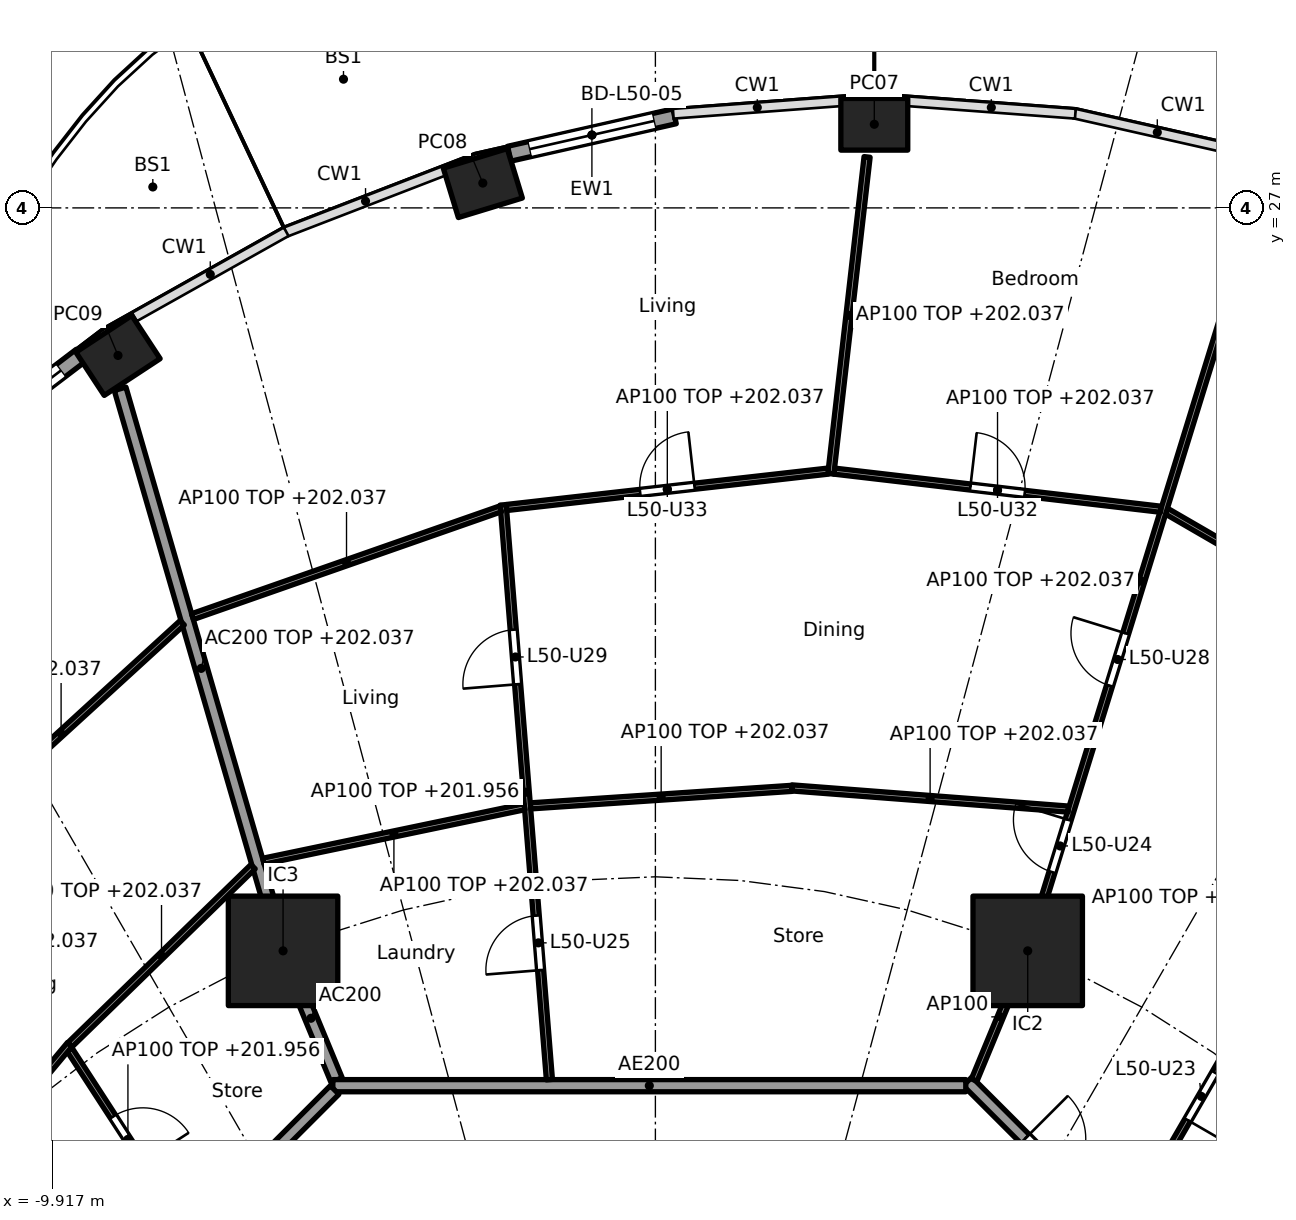
"""IFC4 building model, lengths in metres.
Left out: names, types, materials, properties, quantities, classifications, styles, units other than length and angle.
Written with IfcOpenShell. Run it as: python <this file> out.ifc"""

import sys

from ifc_helpers import new_model, si_unit, direction, frame, frame_2d, origin, origin_2d, place, context, subcontext, project, spatial, rectangle, hollow_rectangle, extrude, element, fill, save


model = new_model("IFC4")
c1 = context("Model", 3, precision=1e-05, world=origin(), true_north=direction((0.0, 1.0)))
c2 = subcontext(c1, "Body", "Model", "MODEL_VIEW")
j1 = project(units=[si_unit("LENGTHUNIT", "METRE"), si_unit("PLANEANGLEUNIT", "RADIAN")], contexts=[c1])
p1 = place(None, origin())
s1 = spatial("IfcSite", under=j1, at=p1, CompositionType="ELEMENT")
p2 = place(p1, origin())
s2 = spatial("IfcBuilding", under=s1, at=p2, CompositionType="ELEMENT")
p3 = place(p2, frame((0.0, 0.0, 199.2)))
s3 = spatial("IfcBuildingStorey", under=s2, at=p3, CompositionType="ELEMENT", Elevation=199.2)
for number, where, z_axis, x_axis in (
    (1, (3.6, 28.375, 0.0), (0.0, 0.0, 1.0), (-1.0, 0.0, 0.0)),
    (2, (-2.838, 27.408, 0.0), (0.0, 0.0, 1.0), (-0.957, -0.292, 0.0)),
    (3, (-8.837, 24.573, 0.0), (0.0, 0.0, 1.0), (-0.836, -0.549, 0.0)),
):
    element("IfcColumn", number, at=place(p3, frame(where, z_axis=z_axis, x_axis=x_axis)), inside=s3, PredefinedType="COLUMN", context=c2, shape_type="SweptSolid", body=[
        extrude(hollow_rectangle(XDim=1.1, YDim=0.85, WallThickness=0.036, at=origin_2d()), origin(), (0.0, 0.0, 1.0), 3.7),
    ])
for number, where, z_axis, x_axis in (
    (4, (6.123, 14.782, 0.0), (0.0, 0.0, 1.0), (1.0, 0.0, 0.0)),
    (5, (-6.123, 14.782, 0.0), (0.0, 0.0, 1.0), (1.0, 0.0, 0.0)),
):
    element("IfcColumn", number, at=place(p3, frame(where, z_axis=z_axis, x_axis=x_axis)), inside=s3, PredefinedType="COLUMN", context=c2, shape_type="SweptSolid", body=[
        extrude(rectangle(XDim=1.8, YDim=1.8, at=origin_2d()), origin(), (0.0, 0.0, 1.0), 3.7),
    ])
p4 = place(p3, frame((-2.404, 27.891, 0.0), z_axis=(0.0, 0.0, 1.0), x_axis=(0.975324329911, 0.220776926974, 0.0)))
e6 = element("IfcWall", 6, at=p4, inside=s3, PredefinedType="SOLIDWALL", context=c2, shape_type="SweptSolid", body=[
    extrude(rectangle(XDim=2.788, YDim=0.25, at=frame_2d((1.394, 0.0))), origin(), (0.0, 0.0, 1.0), 3.44),
])
p5 = place(p4, frame((0.344, 0.0, 0.0)))
e7 = element("IfcOpeningElement", 7, at=p5, cuts=e6, PredefinedType="OPENING", context=c2, shape_type="SweptSolid", body=[
    extrude(rectangle(XDim=2.1, YDim=2.4, at=frame_2d((1.05, 1.2))), frame((0.0, 0.135, 0.0), z_axis=(0.0, -1.0, 0.0), x_axis=(1.0, 0.0, 0.0)), (0.0, 0.0, 1.0), 0.27),
])
p6 = place(p3, frame((-11.772, 22.809, 0.0), z_axis=(0.0, 0.0, 1.0), x_axis=(0.796055733703, 0.60522332146, 0.0)))
e8 = element("IfcWall", 8, at=p6, inside=s3, PredefinedType="SOLIDWALL", context=c2, shape_type="SweptSolid", body=[
    extrude(rectangle(XDim=2.917, YDim=0.25, at=frame_2d((1.458, 0.0))), origin(), (0.0, 0.0, 1.0), 3.44),
])
p7 = place(p6, frame((0.408, 0.0, 0.0)))
e9 = element("IfcOpeningElement", 9, at=p7, cuts=e8, PredefinedType="OPENING", context=c2, shape_type="SweptSolid", body=[
    extrude(rectangle(XDim=2.1, YDim=2.4, at=frame_2d((1.05, 1.2))), frame((0.0, 0.135, 0.0), z_axis=(0.0, -1.0, 0.0), x_axis=(1.0, 0.0, 0.0)), (0.0, 0.0, 1.0), 0.27),
])
p8 = place(p3, frame((-5.243, 12.657, 0.0), z_axis=(0.0, 0.0, 1.0), x_axis=(-0.382707856524, 0.923869415315, 0.0)))
e10 = element("IfcWall", 10, at=p8, inside=s3, PredefinedType="PARTITIONING", context=c2, shape_type="SweptSolid", body=[
    extrude(rectangle(XDim=2.2, YDim=0.2, at=frame_2d((1.1, 0.0))), origin(), (0.0, 0.0, 1.0), 3.44),
])
p9 = place(p3, frame((-6.137, 14.83, 0.0), z_axis=(0.0, 0.0, 1.0), x_axis=(-0.278461169897, 0.96044748782, 0.0)))
e11 = element("IfcWall", 11, at=p9, inside=s3, PredefinedType="PARTITIONING", context=c2, shape_type="SweptSolid", body=[
    extrude(rectangle(XDim=9.573, YDim=0.2, at=frame_2d((4.787, 0.0))), origin(), (0.0, 0.0, 1.0), 2.837),
])
p10 = place(p3, frame((12.635, 5.134, 0.0), z_axis=(0.0, 0.0, 1.0), x_axis=(-0.707106781187, 0.707106781187, 0.0)))
e12 = element("IfcWall", 12, at=p10, inside=s3, PredefinedType="PARTITIONING", context=c2, shape_type="SweptSolid", body=[
    extrude(rectangle(XDim=10.609, YDim=0.2, at=frame_2d((5.305, 0.0))), origin(), (0.0, 0.0, 1.0), 3.44),
])
p11 = place(p10, frame((8.274, 0.0, 0.0)))
e13 = element("IfcOpeningElement", 13, at=p11, cuts=e12, PredefinedType="OPENING", context=c2, shape_type="SweptSolid", body=[
    extrude(rectangle(XDim=1.0, YDim=2.1, at=frame_2d((0.5, 1.05))), frame((0.0, 0.11, 0.0), z_axis=(0.0, -1.0, 0.0), x_axis=(1.0, 0.0, 0.0)), (0.0, 0.0, 1.0), 0.22),
])
p12 = place(p3, frame((5.104, 12.565, 0.0), z_axis=(0.0, 0.0, 1.0), x_axis=(-1.0, 0.0, 0.0)))
e14 = element("IfcWall", 14, at=p12, inside=s3, PredefinedType="PARTITIONING", context=c2, shape_type="SweptSolid", body=[
    extrude(rectangle(XDim=10.409, YDim=0.2, at=frame_2d((5.205, 0.0))), origin(), (0.0, 0.0, 1.0), 3.44),
])
p13 = place(p3, frame((-5.275, 12.494, 0.0), z_axis=(0.0, 0.0, 1.0), x_axis=(-0.707106781187, -0.707106781187, 0.0)))
e15 = element("IfcWall", 15, at=p13, inside=s3, PredefinedType="PARTITIONING", context=c2, shape_type="SweptSolid", body=[
    extrude(rectangle(XDim=10.209, YDim=0.2, at=frame_2d((5.104, 0.0))), origin(), (0.0, 0.0, 1.0), 3.44),
])
p14 = place(p3, frame((7.708, 10.198, 0.0), z_axis=(0.0, 0.0, 1.0), x_axis=(0.501288100085, 0.865280440501, 0.0)))
e16 = element("IfcWall", 16, at=p14, inside=s3, PredefinedType="PARTITIONING", context=c2, shape_type="SweptSolid", body=[
    extrude(rectangle(XDim=10.623, YDim=0.1, at=frame_2d((5.312, 0.0))), origin(), (0.0, 0.0, 1.0), 2.756),
])
p15 = place(p14, frame((2.082, 0.0, 0.0)))
e17 = element("IfcOpeningElement", 17, at=p15, cuts=e16, PredefinedType="OPENING", context=c2, shape_type="SweptSolid", body=[
    extrude(rectangle(XDim=0.9, YDim=2.1, at=frame_2d((0.45, 1.05))), frame((0.0, 0.06, 0.0), z_axis=(0.0, -1.0, 0.0), x_axis=(1.0, 0.0, 0.0)), (0.0, 0.0, 1.0), 0.12),
])
p16 = place(p14, frame((7.369, 0.0, 0.0)))
e18 = element("IfcOpeningElement", 18, at=p16, cuts=e16, PredefinedType="OPENING", context=c2, shape_type="SweptSolid", body=[
    extrude(rectangle(XDim=0.9, YDim=2.1, at=frame_2d((0.45, 1.05))), frame((0.0, 0.06, 0.0), z_axis=(0.0, -1.0, 0.0), x_axis=(1.0, 0.0, 0.0)), (0.0, 0.0, 1.0), 0.12),
])
p17 = place(p3, frame((12.965, 19.371, 0.0), z_axis=(0.0, 0.0, 1.0), x_axis=(-0.865277177388, 0.501293732547, 0.0)))
e19 = element("IfcWall", 19, at=p17, inside=s3, PredefinedType="PARTITIONING", context=c2, shape_type="SweptSolid", body=[
    extrude(rectangle(XDim=5.27, YDim=0.1, at=frame_2d((2.635, 0.0))), origin(), (0.0, 0.0, 1.0), 2.837),
])
p18 = place(p3, frame((5.243, 12.657, 0.0), z_axis=(0.0, 0.0, 1.0), x_axis=(0.382719158442, 0.923864733477, 0.0)))
e20 = element("IfcWall", 20, at=p18, inside=s3, PredefinedType="PARTITIONING", context=c2, shape_type="SweptSolid", body=[
    extrude(rectangle(XDim=2.25, YDim=0.1, at=frame_2d((1.125, 0.0))), origin(), (0.0, 0.0, 1.0), 3.44),
])
p19 = place(p3, frame((6.138, 14.83, 0.0), z_axis=(0.0, 0.0, 1.0), x_axis=(0.294818517221, 0.955553264818, 0.0)))
e21 = element("IfcWall", 21, at=p19, inside=s3, PredefinedType="PARTITIONING", context=c2, shape_type="SweptSolid", body=[
    extrude(rectangle(XDim=12.619, YDim=0.1, at=frame_2d((6.31, 0.0))), origin(), (0.0, 0.0, 1.0), 2.837),
])
p20 = place(p19, frame((1.306, 0.0, 0.0)))
e22 = element("IfcOpeningElement", 22, at=p20, cuts=e21, PredefinedType="OPENING", context=c2, shape_type="SweptSolid", body=[
    extrude(rectangle(XDim=0.9, YDim=2.1, at=frame_2d((0.45, 1.05))), frame((0.0, 0.06, 0.0), z_axis=(0.0, -1.0, 0.0), x_axis=(1.0, 0.0, 0.0)), (0.0, 0.0, 1.0), 0.12),
])
p21 = place(p19, frame((4.515, 0.0, 0.0)))
e23 = element("IfcOpeningElement", 23, at=p21, cuts=e21, PredefinedType="OPENING", context=c2, shape_type="SweptSolid", body=[
    extrude(rectangle(XDim=0.9, YDim=2.1, at=frame_2d((0.45, 1.05))), frame((0.0, 0.06, 0.0), z_axis=(0.0, -1.0, 0.0), x_axis=(1.0, 0.0, 0.0)), (0.0, 0.0, 1.0), 0.12),
])
p22 = place(p3, frame((6.791, 17.113, 0.0), z_axis=(0.0, 0.0, 1.0), x_axis=(-0.997077117727, 0.07640171009, 0.0)))
e24 = element("IfcWall", 24, at=p22, inside=s3, PredefinedType="PARTITIONING", context=c2, shape_type="SweptSolid", body=[
    extrude(rectangle(XDim=4.56, YDim=0.1, at=frame_2d((2.28, 0.0))), origin(), (0.0, 0.0, 1.0), 2.837),
])
p23 = place(p3, frame((8.312, 22.044, 0.0), z_axis=(0.0, 0.0, 1.0), x_axis=(-0.993245806382, 0.1160291692, 0.0)))
e25 = element("IfcWall", 25, at=p23, inside=s3, PredefinedType="PARTITIONING", context=c2, shape_type="SweptSolid", body=[
    extrude(rectangle(XDim=5.408, YDim=0.1, at=frame_2d((2.704, 0.0))), origin(), (0.0, 0.0, 1.0), 2.837),
])
p24 = place(p23, frame((2.254, 0.0, 0.0)))
e26 = element("IfcOpeningElement", 26, at=p24, cuts=e25, PredefinedType="OPENING", context=c2, shape_type="SweptSolid", body=[
    extrude(rectangle(XDim=0.9, YDim=2.1, at=frame_2d((0.45, 1.05))), frame((0.0, 0.06, 0.0), z_axis=(0.0, -1.0, 0.0), x_axis=(1.0, 0.0, 0.0)), (0.0, 0.0, 1.0), 0.12),
])
p25 = place(p3, frame((2.244, 17.455, 0.0), z_axis=(0.0, 0.0, 1.0), x_axis=(-0.997754717554, -0.066974051687, 0.0)))
e27 = element("IfcWall", 27, at=p25, inside=s3, PredefinedType="PARTITIONING", context=c2, shape_type="SweptSolid", body=[
    extrude(rectangle(XDim=4.309, YDim=0.1, at=frame_2d((2.154, 0.0))), origin(), (0.0, 0.0, 1.0), 2.837),
])
p26 = place(p3, frame((2.885, 22.627, 0.0), z_axis=(0.0, 0.0, 1.0), x_axis=(0.113634556485, 0.993522615531, 0.0)))
e28 = element("IfcWall", 28, at=p26, inside=s3, PredefinedType="PARTITIONING", context=c2, shape_type="SweptSolid", body=[
    extrude(rectangle(XDim=5.244, YDim=0.1, at=frame_2d((2.622, 0.0))), origin(), (0.0, 0.0, 1.0), 2.837),
])
p27 = place(p3, frame((2.842, 22.671, 0.0), z_axis=(0.0, 0.0, 1.0), x_axis=(-0.993660315081, -0.112424099879, 0.0)))
e29 = element("IfcWall", 29, at=p27, inside=s3, PredefinedType="PARTITIONING", context=c2, shape_type="SweptSolid", body=[
    extrude(rectangle(XDim=5.325, YDim=0.1, at=frame_2d((2.662, 0.0))), origin(), (0.0, 0.0, 1.0), 2.837),
])
p28 = place(p27, frame((2.212, 0.0, 0.0)))
e30 = element("IfcOpeningElement", 30, at=p28, cuts=e29, PredefinedType="OPENING", context=c2, shape_type="SweptSolid", body=[
    extrude(rectangle(XDim=0.9, YDim=2.1, at=frame_2d((0.45, 1.05))), frame((0.0, 0.06, 0.0), z_axis=(0.0, -1.0, 0.0), x_axis=(1.0, 0.0, 0.0)), (0.0, 0.0, 1.0), 0.12),
])
p29 = place(p3, frame((-1.743, 12.665, 0.0), z_axis=(0.0, 0.0, 1.0), x_axis=(-0.080170892619, 0.996781133437, 0.0)))
e31 = element("IfcWall", 31, at=p29, inside=s3, PredefinedType="PARTITIONING", context=c2, shape_type="SweptSolid", body=[
    extrude(rectangle(XDim=9.483, YDim=0.1, at=frame_2d((4.741, 0.0))), origin(), (0.0, 0.0, 1.0), 2.756),
])
p30 = place(p29, frame((1.806, 0.0, 0.0)))
e32 = element("IfcOpeningElement", 32, at=p30, cuts=e31, PredefinedType="OPENING", context=c2, shape_type="SweptSolid", body=[
    extrude(rectangle(XDim=0.9, YDim=2.1, at=frame_2d((0.45, 1.05))), frame((0.0, 0.06, 0.0), z_axis=(0.0, -1.0, 0.0), x_axis=(1.0, 0.0, 0.0)), (0.0, 0.0, 1.0), 0.12),
])
p31 = place(p29, frame((6.523, 0.0, 0.0)))
e33 = element("IfcOpeningElement", 33, at=p31, cuts=e31, PredefinedType="OPENING", context=c2, shape_type="SweptSolid", body=[
    extrude(rectangle(XDim=0.9, YDim=2.1, at=frame_2d((0.45, 1.05))), frame((0.0, 0.06, 0.0), z_axis=(0.0, -1.0, 0.0), x_axis=(1.0, 0.0, 0.0)), (0.0, 0.0, 1.0), 0.12),
])
p32 = place(p3, frame((-2.154, 17.152, 0.0), z_axis=(0.0, 0.0, 1.0), x_axis=(-0.978906251581, -0.204309937631, 0.0)))
e34 = element("IfcWall", 34, at=p32, inside=s3, PredefinedType="PARTITIONING", context=c2, shape_type="SweptSolid", body=[
    extrude(rectangle(XDim=4.385, YDim=0.1, at=frame_2d((2.193, 0.0))), origin(), (0.0, 0.0, 1.0), 2.837),
])
p33 = place(p3, frame((-2.546, 22.051, 0.0), z_axis=(0.0, 0.0, 1.0), x_axis=(-0.94391294884, -0.330194404878, 0.0)))
e35 = element("IfcWall", 35, at=p33, inside=s3, PredefinedType="PARTITIONING", context=c2, shape_type="SweptSolid", body=[
    extrude(rectangle(XDim=5.367, YDim=0.1, at=frame_2d((2.684, 0.0))), origin(), (0.0, 0.0, 1.0), 2.837),
])
p34 = place(p3, frame((-6.616, 16.166, 0.0), z_axis=(0.0, 0.0, 1.0), x_axis=(-0.716919058692, -0.697156412352, 0.0)))
e36 = element("IfcWall", 36, at=p34, inside=s3, PredefinedType="PARTITIONING", context=c2, shape_type="SweptSolid", body=[
    extrude(rectangle(XDim=4.2, YDim=0.1, at=frame_2d((2.1, 0.0))), origin(), (0.0, 0.0, 1.0), 2.837),
])
p35 = place(p3, frame((-7.781, 20.178, 0.0), z_axis=(0.0, 0.0, 1.0), x_axis=(-0.73807320557, -0.674720640872, 0.0)))
e37 = element("IfcWall", 37, at=p35, inside=s3, PredefinedType="PARTITIONING", context=c2, shape_type="SweptSolid", body=[
    extrude(rectangle(XDim=5.399, YDim=0.1, at=frame_2d((2.699, 0.0))), origin(), (0.0, 0.0, 1.0), 2.837),
])
p36 = place(p3, frame((-7.712, 10.195, 0.0), z_axis=(0.0, 0.0, 1.0), x_axis=(-0.544170086001, 0.838974920663, 0.0)))
e38 = element("IfcWall", 38, at=p36, inside=s3, PredefinedType="PARTITIONING", context=c2, shape_type="SweptSolid", body=[
    extrude(rectangle(XDim=3.535, YDim=0.1, at=frame_2d((1.768, 0.0))), origin(), (0.0, 0.0, 1.0), 2.756),
])
p37 = place(p36, frame((1.318, 0.0, 0.0)))
e39 = element("IfcOpeningElement", 39, at=p37, cuts=e38, PredefinedType="OPENING", context=c2, shape_type="SweptSolid", body=[
    extrude(rectangle(XDim=0.9, YDim=2.1, at=frame_2d((0.45, 1.05))), frame((0.0, 0.06, 0.0), z_axis=(0.0, -1.0, 0.0), x_axis=(1.0, 0.0, 0.0)), (0.0, 0.0, 1.0), 0.12),
])
p38 = place(p3, frame((-9.631, 13.242, 0.0), z_axis=(0.0, 0.0, 1.0), x_axis=(-0.640315711982, -0.768111833647, 0.0)))
e40 = element("IfcWall", 40, at=p38, inside=s3, PredefinedType="PARTITIONING", context=c2, shape_type="SweptSolid", body=[
    extrude(rectangle(XDim=4.572, YDim=0.1, at=frame_2d((2.286, 0.0))), origin(), (0.0, 0.0, 1.0), 2.837),
])
p39 = place(p5, origin())
e41 = element("IfcDoor", 41, at=p39, inside=s3, OperationType="SLIDING_TO_LEFT", PredefinedType="DOOR", context=c2, shape_type="SweptSolid", body=[
    extrude(rectangle(XDim=2.1, YDim=2.4, at=frame_2d((1.05, 1.2))), frame((0.0, 0.025, 0.0), z_axis=(0.0, -1.0, 0.0), x_axis=(1.0, 0.0, 0.0)), (0.0, 0.0, 1.0), 0.05),
])
fill(e7, e41)
p40 = place(p7, origin())
e42 = element("IfcDoor", 42, at=p40, inside=s3, OperationType="SLIDING_TO_LEFT", PredefinedType="DOOR", context=c2, shape_type="SweptSolid", body=[
    extrude(rectangle(XDim=2.1, YDim=2.4, at=frame_2d((1.05, 1.2))), frame((0.0, 0.025, 0.0), z_axis=(0.0, -1.0, 0.0), x_axis=(1.0, 0.0, 0.0)), (0.0, 0.0, 1.0), 0.05),
])
fill(e9, e42)
p41 = place(p11, frame((1.0, 0.0, 0.0), x_axis=(-1.0, 0.0, 0.0)))
e43 = element("IfcDoor", 43, at=p41, inside=s3, OperationType="SINGLE_SWING_LEFT", PredefinedType="DOOR", context=c2, shape_type="SweptSolid", body=[
    extrude(rectangle(XDim=1.0, YDim=2.1, at=frame_2d((0.5, 1.05))), frame((0.0, 0.025, 0.0), z_axis=(0.0, -1.0, 0.0), x_axis=(1.0, 0.0, 0.0)), (0.0, 0.0, 1.0), 0.05),
])
fill(e13, e43)
p42 = place(p15, frame((0.9, 0.0, 0.0), x_axis=(-1.0, 0.0, 0.0)))
e44 = element("IfcDoor", 44, at=p42, inside=s3, OperationType="SINGLE_SWING_RIGHT", PredefinedType="DOOR", context=c2, shape_type="SweptSolid", body=[
    extrude(rectangle(XDim=0.9, YDim=2.1, at=frame_2d((0.45, 1.05))), frame((0.0, 0.025, 0.0), z_axis=(0.0, -1.0, 0.0), x_axis=(1.0, 0.0, 0.0)), (0.0, 0.0, 1.0), 0.05),
])
fill(e17, e44)
p43 = place(p20, origin())
e45 = element("IfcDoor", 45, at=p43, inside=s3, OperationType="SINGLE_SWING_RIGHT", PredefinedType="DOOR", context=c2, shape_type="SweptSolid", body=[
    extrude(rectangle(XDim=0.9, YDim=2.1, at=frame_2d((0.45, 1.05))), frame((0.0, 0.025, 0.0), z_axis=(0.0, -1.0, 0.0), x_axis=(1.0, 0.0, 0.0)), (0.0, 0.0, 1.0), 0.05),
])
fill(e22, e45)
p44 = place(p30, origin())
e46 = element("IfcDoor", 46, at=p44, inside=s3, OperationType="SINGLE_SWING_LEFT", PredefinedType="DOOR", context=c2, shape_type="SweptSolid", body=[
    extrude(rectangle(XDim=0.9, YDim=2.1, at=frame_2d((0.45, 1.05))), frame((0.0, 0.025, 0.0), z_axis=(0.0, -1.0, 0.0), x_axis=(1.0, 0.0, 0.0)), (0.0, 0.0, 1.0), 0.05),
])
fill(e32, e46)
p45 = place(p21, origin())
e47 = element("IfcDoor", 47, at=p45, inside=s3, OperationType="SINGLE_SWING_RIGHT", PredefinedType="DOOR", context=c2, shape_type="SweptSolid", body=[
    extrude(rectangle(XDim=0.9, YDim=2.1, at=frame_2d((0.45, 1.05))), frame((0.0, 0.025, 0.0), z_axis=(0.0, -1.0, 0.0), x_axis=(1.0, 0.0, 0.0)), (0.0, 0.0, 1.0), 0.05),
])
fill(e23, e47)
p46 = place(p31, origin())
e48 = element("IfcDoor", 48, at=p46, inside=s3, OperationType="SINGLE_SWING_LEFT", PredefinedType="DOOR", context=c2, shape_type="SweptSolid", body=[
    extrude(rectangle(XDim=0.9, YDim=2.1, at=frame_2d((0.45, 1.05))), frame((0.0, 0.025, 0.0), z_axis=(0.0, -1.0, 0.0), x_axis=(1.0, 0.0, 0.0)), (0.0, 0.0, 1.0), 0.05),
])
fill(e33, e48)
p47 = place(p24, frame((0.9, 0.0, 0.0), x_axis=(-1.0, 0.0, 0.0)))
e49 = element("IfcDoor", 49, at=p47, inside=s3, OperationType="SINGLE_SWING_LEFT", PredefinedType="DOOR", context=c2, shape_type="SweptSolid", body=[
    extrude(rectangle(XDim=0.9, YDim=2.1, at=frame_2d((0.45, 1.05))), frame((0.0, 0.025, 0.0), z_axis=(0.0, -1.0, 0.0), x_axis=(1.0, 0.0, 0.0)), (0.0, 0.0, 1.0), 0.05),
])
fill(e26, e49)
p48 = place(p28, frame((0.9, 0.0, 0.0), x_axis=(-1.0, 0.0, 0.0)))
e50 = element("IfcDoor", 50, at=p48, inside=s3, OperationType="SINGLE_SWING_RIGHT", PredefinedType="DOOR", context=c2, shape_type="SweptSolid", body=[
    extrude(rectangle(XDim=0.9, YDim=2.1, at=frame_2d((0.45, 1.05))), frame((0.0, 0.025, 0.0), z_axis=(0.0, -1.0, 0.0), x_axis=(1.0, 0.0, 0.0)), (0.0, 0.0, 1.0), 0.05),
])
fill(e30, e50)
p49 = place(p37, frame((0.9, 0.0, 0.0), x_axis=(-1.0, 0.0, 0.0)))
e51 = element("IfcDoor", 51, at=p49, inside=s3, OperationType="SINGLE_SWING_RIGHT", PredefinedType="DOOR", context=c2, shape_type="SweptSolid", body=[
    extrude(rectangle(XDim=0.9, YDim=2.1, at=frame_2d((0.45, 1.05))), frame((0.0, 0.025, 0.0), z_axis=(0.0, -1.0, 0.0), x_axis=(1.0, 0.0, 0.0)), (0.0, 0.0, 1.0), 0.05),
])
fill(e39, e51)
save(model, sys.argv[1])
